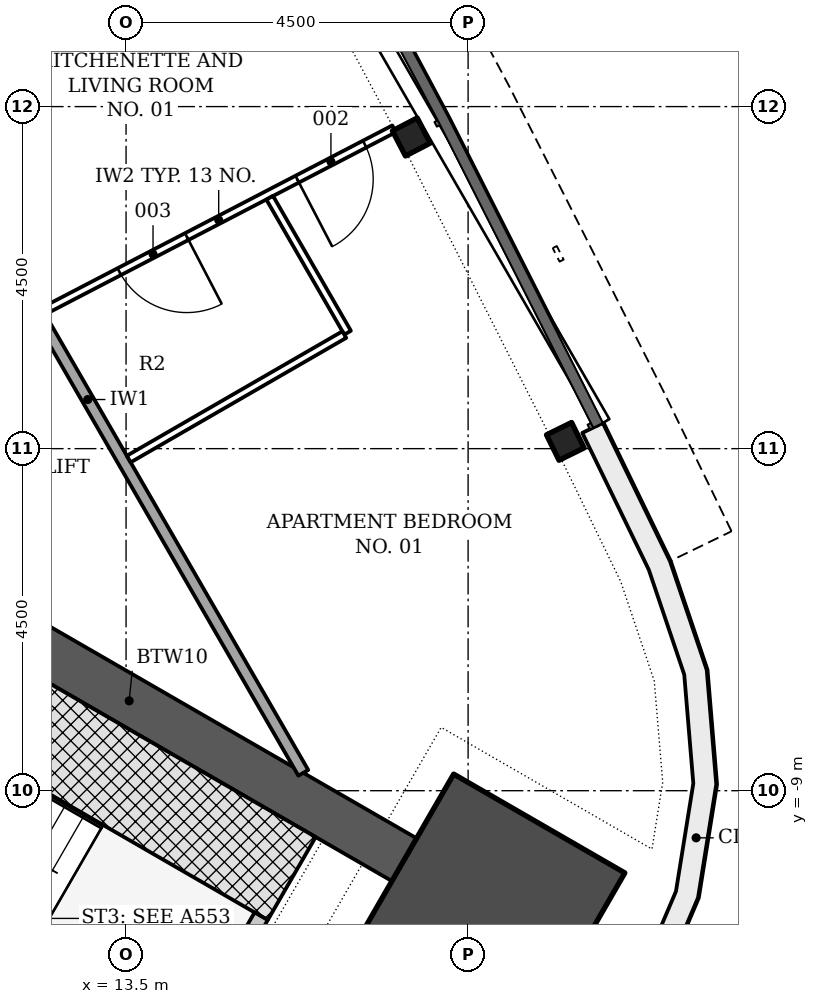
"""IFC4 building model, lengths in metres.
Left out: names, types, materials, properties, quantities, classifications, styles, units other than length and angle.
Written with IfcOpenShell. Run it as: python <this file> out.ifc"""

import sys

from ifc_helpers import new_model, si_unit, direction, frame, frame_2d, origin, origin_2d, place, context, subcontext, project, spatial, polyline, rectangle, i_section, outline, extrude, element, fill, save


model = new_model("IFC4")
c1 = context("Model", 3, precision=1e-05, world=origin(), true_north=direction((0.0, 1.0)))
c2 = subcontext(c1, "Body", "Model", "MODEL_VIEW")
j1 = project(units=[si_unit("LENGTHUNIT", "METRE"), si_unit("PLANEANGLEUNIT", "RADIAN")], contexts=[c1])
p1 = place(None, origin())
s1 = spatial("IfcSite", under=j1, at=p1, CompositionType="ELEMENT")
p2 = place(p1, origin())
s2 = spatial("IfcBuilding", under=s1, at=p2, CompositionType="ELEMENT")
p3 = place(p2, frame((0.0, 0.0, 214.8)))
s3 = spatial("IfcBuildingStorey", under=s2, at=p3, CompositionType="ELEMENT", Elevation=214.8)
p4 = place(p3, frame((9.922, -5.728, -0.2), z_axis=(0.0, 0.0, 1.0), x_axis=(0.866030911543, -0.499990460161, 0.0)))
e1 = element("IfcWall", 1, at=p4, inside=s3, PredefinedType="SHEAR", context=c2, shape_type="SweptSolid", body=[
    extrude(rectangle(XDim=8.359, YDim=0.65, at=frame_2d((4.179, 0.0))), origin(), (0.0, 0.0, 1.0), 3.6),
])
p5 = place(p3, frame((18.286, -10.558, -0.2), z_axis=(0.0, 0.0, 1.0), x_axis=(0.866025403784, -0.5, 0.0)))
e2 = element("IfcColumn", 2, at=p5, inside=s3, PredefinedType="COLUMN", context=c2, shape_type="SweptSolid", body=[
    extrude(rectangle(XDim=2.6, YDim=2.6, at=origin_2d()), origin(), (0.0, 0.0, 1.0), 3.6),
])
for number, where, z_axis, x_axis in (
    (3, (19.279, -4.404, -0.2), (0.0, 0.0, 1.0), (-0.441, 0.897, 0.0)),
    (4, (17.253, -0.4, -0.2), (0.0, 0.0, 1.0), (-0.461, 0.887, 0.0)),
):
    element("IfcColumn", number, at=place(p3, frame(where, z_axis=z_axis, x_axis=x_axis)), inside=s3, PredefinedType="COLUMN", context=c2, shape_type="SweptSolid", body=[
        extrude(i_section(OverallWidth=0.373, OverallDepth=0.368, WebThickness=0.015, FlangeThickness=0.024, FilletRadius=0.015, at=origin_2d()), origin(), (0.0, 0.0, 1.0), 3.6),
    ])
p6 = place(p3, origin())
e5 = element("IfcWall", 5, at=p6, inside=s3, PredefinedType="NOTDEFINED", context=c2, shape_type="SweptSolid", body=[
    extrude(outline(polyline([(13.49, -15.042), (15.507, -14.898), (16.988, -14.602), (18.354, -13.958), (19.526, -13.004), (20.434, -11.797), (21.025, -10.408), (21.265, -8.917), (21.139, -7.411), (20.656, -5.98), (19.772, -4.162), (19.502, -4.293), (20.378, -6.094), (20.844, -7.473), (20.963, -8.905), (20.735, -10.324), (20.172, -11.646), (19.308, -12.795), (18.193, -13.702), (16.893, -14.315), (15.467, -14.6), (13.469, -14.743), (13.49, -15.042)])), origin(), (0.0, 0.0, 1.0), 3.3),
])
p7 = place(p3, frame((9.444, -6.555, -0.2), z_axis=(0.0, 0.0, 1.0), x_axis=(0.866018442252, -0.500012057535, 0.0)))
e6 = element("IfcWall", 6, at=p7, inside=s3, PredefinedType="SHEAR", context=c2, shape_type="SweptSolid", body=[
    extrude(rectangle(XDim=7.2, YDim=1.261, at=frame_2d((3.6, 0.0))), origin(), (0.0, 0.0, 1.0), 3.6),
])
p8 = place(p3, frame((0.0, 0.0, -0.2)))
e7 = element("IfcWall", 7, at=p8, inside=s3, PredefinedType="SHEAR", context=c2, shape_type="SweptSolid", body=[
    extrude(outline(polyline([(12.104, -13.149), (14.289, -12.563), (15.364, -10.701), (15.191, -10.601), (14.157, -12.392), (12.132, -12.934), (12.204, -12.976), (12.204, -12.976), (12.204, -12.976), (12.204, -12.976), (12.204, -12.976), (12.204, -12.976), (12.204, -12.976), (12.204, -12.976), (12.204, -12.976), (12.204, -12.976), (12.204, -12.976), (12.204, -12.976), (12.204, -12.976), (12.204, -12.976), (12.204, -12.976), (12.204, -12.976), (12.204, -12.976), (12.104, -13.149)])), origin(), (0.0, 0.0, 1.0), 3.6),
])
p9 = place(p3, frame((15.832, -8.765, 0.0), z_axis=(0.0, 0.0, 1.0), x_axis=(-0.500005035328, 0.866022496617, 0.0)))
e8 = element("IfcWall", 8, at=p9, inside=s3, PredefinedType="PARTITIONING", context=c2, shape_type="SweptSolid", body=[
    extrude(rectangle(XDim=11.343, YDim=0.15, at=frame_2d((5.671, 0.0))), origin(), (0.0, 0.0, 1.0), 2.852),
])
p10 = place(p3, frame((17.026, -0.292, 0.0), z_axis=(0.0, 0.0, 1.0), x_axis=(-0.887303639302, -0.461185701947, 0.0)))
e9 = element("IfcWall", 9, at=p10, inside=s3, PredefinedType="PARTITIONING", context=c2, shape_type="SweptSolid", body=[
    extrude(rectangle(XDim=5.201, YDim=0.1, at=frame_2d((2.6, 0.0))), origin(), (0.0, 0.0, 1.0), 3.4),
])
p11 = place(p10, frame((0.436, 0.0, 0.0)))
e10 = element("IfcOpeningElement", 10, at=p11, cuts=e9, PredefinedType="OPENING", context=c2, shape_type="SweptSolid", body=[
    extrude(rectangle(XDim=1.0, YDim=2.1, at=frame_2d((0.5, 1.05))), frame((0.0, 0.06, 0.0), z_axis=(0.0, -1.0, 0.0), x_axis=(1.0, 0.0, 0.0)), (0.0, 0.0, 1.0), 0.12),
])
p12 = place(p10, frame((3.074, 0.0, 0.0)))
e11 = element("IfcOpeningElement", 11, at=p12, cuts=e9, PredefinedType="OPENING", context=c2, shape_type="SweptSolid", body=[
    extrude(rectangle(XDim=1.0, YDim=2.1, at=frame_2d((0.5, 1.05))), frame((0.0, 0.06, 0.0), z_axis=(0.0, -1.0, 0.0), x_axis=(1.0, 0.0, 0.0)), (0.0, 0.0, 1.0), 0.12),
])
p13 = place(p3, frame((15.39, -1.199, 0.0), z_axis=(0.0, 0.0, 1.0), x_axis=(0.499956128963, -0.866050731258, 0.0)))
e12 = element("IfcWall", 12, at=p13, inside=s3, PredefinedType="PARTITIONING", context=c2, shape_type="SweptSolid", body=[
    extrude(rectangle(XDim=2.05, YDim=0.1, at=frame_2d((1.025, 0.0))), origin(), (0.0, 0.0, 1.0), 2.852),
])
p14 = place(p3, frame((16.371, -3.0, 0.0), z_axis=(0.0, 0.0, 1.0), x_axis=(-0.866027924134, -0.499995634601, 0.0)))
e13 = element("IfcWall", 13, at=p14, inside=s3, PredefinedType="PARTITIONING", context=c2, shape_type="SweptSolid", body=[
    extrude(rectangle(XDim=3.275, YDim=0.1, at=frame_2d((1.637, 0.0))), origin(), (0.0, 0.0, 1.0), 3.4),
])
p15 = place(p11, origin())
e14 = element("IfcDoor", 14, at=p15, inside=s3, OperationType="SINGLE_SWING_RIGHT", PredefinedType="DOOR", context=c2, shape_type="SweptSolid", body=[
    extrude(rectangle(XDim=1.0, YDim=2.1, at=frame_2d((0.5, 1.05))), frame((0.0, 0.025, 0.0), z_axis=(0.0, -1.0, 0.0), x_axis=(1.0, 0.0, 0.0)), (0.0, 0.0, 1.0), 0.05),
])
fill(e10, e14)
p16 = place(p12, origin())
e15 = element("IfcDoor", 15, at=p16, inside=s3, OperationType="SINGLE_SWING_LEFT", PredefinedType="DOOR", context=c2, shape_type="SweptSolid", body=[
    extrude(rectangle(XDim=1.0, YDim=2.1, at=frame_2d((0.5, 1.05))), frame((0.0, 0.025, 0.0), z_axis=(0.0, -1.0, 0.0), x_axis=(1.0, 0.0, 0.0)), (0.0, 0.0, 1.0), 0.05),
])
fill(e11, e15)
save(model, sys.argv[1])
